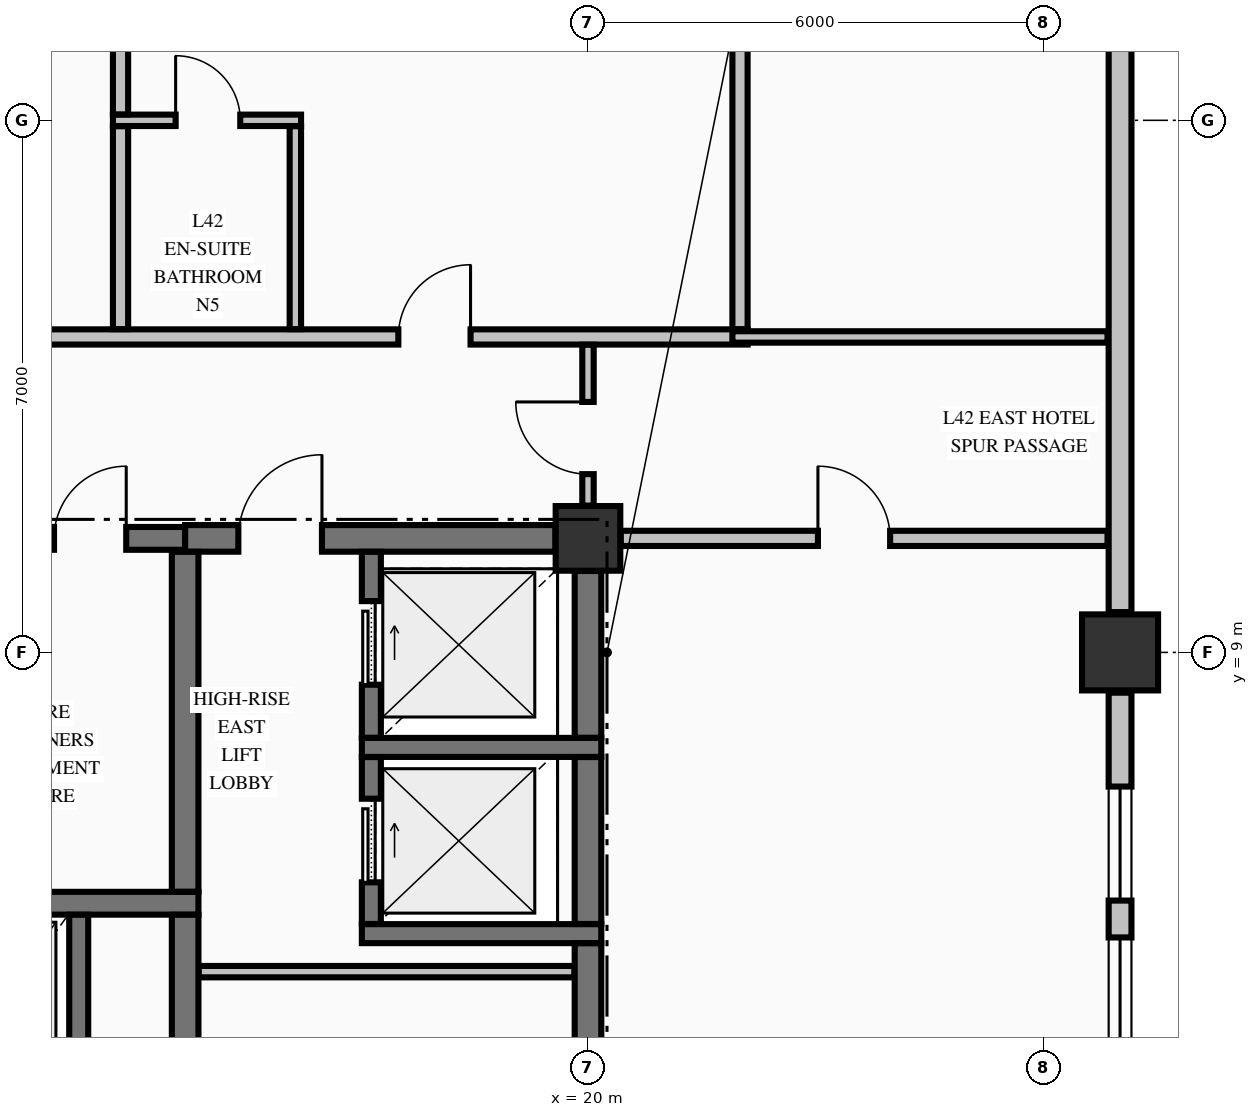
"""IFC4 building model, lengths in metres.
Left out: names, types, materials, properties, quantities, classifications, styles, units other than length and angle.
Written with IfcOpenShell. Run it as: python <this file> out.ifc"""

import sys

from ifc_helpers import new_model, si_unit, direction, frame, frame_2d, origin, origin_2d, place, context, subcontext, project, spatial, rectangle, extrude, element, fill, save


model = new_model("IFC4")
c1 = context("Model", 3, precision=1e-05, world=origin(), true_north=direction((0.0, 1.0)))
c2 = subcontext(c1, "Body", "Model", "MODEL_VIEW")
j1 = project(units=[si_unit("LENGTHUNIT", "METRE"), si_unit("PLANEANGLEUNIT", "RADIAN")], contexts=[c1])
p1 = place(None, origin())
s1 = spatial("IfcSite", under=j1, at=p1, CompositionType="ELEMENT")
p2 = place(p1, origin())
s2 = spatial("IfcBuilding", under=s1, at=p2, CompositionType="ELEMENT")
p3 = place(p2, frame((0.0, 0.0, 166.06)))
s3 = spatial("IfcBuildingStorey", under=s2, at=p3, CompositionType="ELEMENT", Elevation=166.06)
p4 = place(p3, frame((27.0, 9.0, -0.25), z_axis=(0.0, 0.0, 1.0), x_axis=(1.0, 0.0, 0.0)))
e1 = element("IfcColumn", 1, at=p4, inside=s3, PredefinedType="COLUMN", context=c2, shape_type="SweptSolid", body=[
    extrude(rectangle(XDim=1.0, YDim=1.0, at=origin_2d()), origin(), (0.0, 0.0, 1.0), 3.4),
])
p5 = place(p3, frame((20.0, 10.5, -0.25), z_axis=(0.0, 0.0, 1.0), x_axis=(1.0, 0.0, 0.0)))
e2 = element("IfcColumn", 2, at=p5, inside=s3, PredefinedType="COLUMN", context=c2, shape_type="SweptSolid", body=[
    extrude(rectangle(XDim=0.85, YDim=0.85, at=origin_2d()), origin(), (0.0, 0.0, 1.0), 3.4),
])
p6 = place(p3, frame((27.0, 0.53, 0.0), z_axis=(0.0, 0.0, 1.0), x_axis=(0.0, 1.0, 0.0)))
e3 = element("IfcWall", 3, at=p6, inside=s3, PredefinedType="STANDARD", context=c2, shape_type="SweptSolid", body=[
    extrude(rectangle(XDim=7.94, YDim=0.3, at=frame_2d((3.97, 0.0))), origin(), (0.0, 0.0, 1.0), 2.542),
])
p7 = place(p6, frame((1.235, 0.0, 0.72)))
e4 = element("IfcOpeningElement", 4, at=p7, cuts=e3, PredefinedType="OPENING", context=c2, shape_type="SweptSolid", body=[
    extrude(rectangle(XDim=1.5, YDim=1.6, at=frame_2d((0.75, 0.8))), frame((0.0, 0.16, 0.0), z_axis=(0.0, -1.0, 0.0), x_axis=(1.0, 0.0, 0.0)), (0.0, 0.0, 1.0), 0.32),
])
p8 = place(p6, frame((3.22, 0.0, 0.72)))
e5 = element("IfcOpeningElement", 5, at=p8, cuts=e3, PredefinedType="OPENING", context=c2, shape_type="SweptSolid", body=[
    extrude(rectangle(XDim=1.5, YDim=1.6, at=frame_2d((0.75, 0.8))), frame((0.0, 0.16, 0.0), z_axis=(0.0, -1.0, 0.0), x_axis=(1.0, 0.0, 0.0)), (0.0, 0.0, 1.0), 0.32),
])
p9 = place(p6, frame((5.205, 0.0, 0.72)))
e6 = element("IfcOpeningElement", 6, at=p9, cuts=e3, PredefinedType="OPENING", context=c2, shape_type="SweptSolid", body=[
    extrude(rectangle(XDim=1.5, YDim=1.6, at=frame_2d((0.75, 0.8))), frame((0.0, 0.16, 0.0), z_axis=(0.0, -1.0, 0.0), x_axis=(1.0, 0.0, 0.0)), (0.0, 0.0, 1.0), 0.32),
])
p10 = place(p3, frame((27.0, 9.53, 0.0), z_axis=(0.0, 0.0, 1.0), x_axis=(0.0, 1.0, 0.0)))
e7 = element("IfcWall", 7, at=p10, inside=s3, PredefinedType="STANDARD", context=c2, shape_type="SweptSolid", body=[
    extrude(rectangle(XDim=9.44, YDim=0.3, at=frame_2d((4.72, 0.0))), origin(), (0.0, 0.0, 1.0), 2.542),
])
p11 = place(p3, frame((17.025, 5.3, 0.0), z_axis=(0.0, 0.0, 1.0), x_axis=(1.0, 0.0, 0.0)))
e8 = element("IfcWall", 8, at=p11, inside=s3, PredefinedType="SOLIDWALL", context=c2, shape_type="SweptSolid", body=[
    extrude(rectangle(XDim=3.15, YDim=0.25, at=frame_2d((1.575, 0.0))), origin(), (0.0, 0.0, 1.0), 3.15),
])
p12 = place(p3, frame((10.85, 5.7, 0.0), z_axis=(0.0, 0.0, 1.0), x_axis=(1.0, 0.0, 0.0)))
e9 = element("IfcWall", 9, at=p12, inside=s3, PredefinedType="SHEAR", context=c2, shape_type="SweptSolid", body=[
    extrude(rectangle(XDim=4.025, YDim=0.3, at=frame_2d((2.012, 0.0))), origin(), (0.0, 0.0, 1.0), 3.15),
])
p13 = place(p3, frame((17.025, 7.75, 0.0), z_axis=(0.0, 0.0, 1.0), x_axis=(1.0, 0.0, 0.0)))
e10 = element("IfcWall", 10, at=p13, inside=s3, PredefinedType="SOLIDWALL", context=c2, shape_type="SweptSolid", body=[
    extrude(rectangle(XDim=3.15, YDim=0.25, at=frame_2d((1.575, 0.0))), origin(), (0.0, 0.0, 1.0), 3.15),
])
p14 = place(p3, frame((11.429, 10.5, 0.0), z_axis=(0.0, 0.0, 1.0), x_axis=(1.0, 0.0, 0.0)))
e11 = element("IfcWall", 11, at=p14, inside=s3, PredefinedType="SHEAR", context=c2, shape_type="SweptSolid", body=[
    extrude(rectangle(XDim=3.271, YDim=0.3, at=frame_2d((1.635, 0.0))), origin(), (0.0, 0.0, 1.0), 3.15),
])
p15 = place(p14, frame((1.546, 0.0, 0.0)))
e12 = element("IfcOpeningElement", 12, at=p15, cuts=e11, PredefinedType="OPENING", context=c2, shape_type="SweptSolid", body=[
    extrude(rectangle(XDim=0.95, YDim=2.15, at=frame_2d((0.475, 1.075))), frame((0.0, 0.16, 0.0), z_axis=(0.0, -1.0, 0.0), x_axis=(1.0, 0.0, 0.0)), (0.0, 0.0, 1.0), 0.32),
])
p16 = place(p3, frame((14.7, 10.5, 0.0), z_axis=(0.0, 0.0, 1.0), x_axis=(1.0, 0.0, 0.0)))
e13 = element("IfcWall", 13, at=p16, inside=s3, PredefinedType="SHEAR", context=c2, shape_type="SweptSolid", body=[
    extrude(rectangle(XDim=4.871, YDim=0.35, at=frame_2d((2.436, 0.0))), origin(), (0.0, 0.0, 1.0), 3.15),
])
p17 = place(p16, frame((0.7, 0.0, 0.0)))
e14 = element("IfcOpeningElement", 14, at=p17, cuts=e13, PredefinedType="OPENING", context=c2, shape_type="SweptSolid", body=[
    extrude(rectangle(XDim=1.1, YDim=2.15, at=frame_2d((0.55, 1.075))), frame((0.0, 0.185, 0.0), z_axis=(0.0, -1.0, 0.0), x_axis=(1.0, 0.0, 0.0)), (0.0, 0.0, 1.0), 0.37),
])
p18 = place(p3, frame((14.878, 4.8, 0.0), z_axis=(0.0, 0.0, 1.0), x_axis=(1.0, 0.0, 0.0)))
e15 = element("IfcWall", 15, at=p18, inside=s3, PredefinedType="PARTITIONING", context=c2, shape_type="SweptSolid", body=[
    extrude(rectangle(XDim=4.944, YDim=0.15, at=frame_2d((2.472, 0.0))), origin(), (0.0, 0.0, 1.0), 3.15),
])
p19 = place(p3, frame((20.431, 10.5, 0.0), z_axis=(0.0, 0.0, 1.0), x_axis=(1.0, 0.0, 0.0)))
e16 = element("IfcWall", 16, at=p19, inside=s3, PredefinedType="PARTITIONING", context=c2, shape_type="SweptSolid", body=[
    extrude(rectangle(XDim=6.404, YDim=0.2, at=frame_2d((3.202, 0.0))), origin(), (0.0, 0.0, 1.0), 3.15),
])
p20 = place(p19, frame((2.594, 0.0, 0.0)))
e17 = element("IfcOpeningElement", 17, at=p20, cuts=e16, PredefinedType="OPENING", context=c2, shape_type="SweptSolid", body=[
    extrude(rectangle(XDim=0.95, YDim=2.15, at=frame_2d((0.475, 1.075))), frame((0.0, 0.11, 0.0), z_axis=(0.0, -1.0, 0.0), x_axis=(1.0, 0.0, 0.0)), (0.0, 0.0, 1.0), 0.22),
])
p21 = place(p3, frame((-17.1, 13.15, 0.0), z_axis=(0.0, 0.0, 1.0), x_axis=(1.0, 0.0, 0.0)))
e18 = element("IfcWall", 18, at=p21, inside=s3, PredefinedType="PARTITIONING", context=c2, shape_type="SweptSolid", body=[
    extrude(rectangle(XDim=39.2, YDim=0.2, at=frame_2d((19.6, 0.0))), origin(), (0.0, 0.0, 1.0), 3.15),
])
p22 = place(p21, frame((3.575, 0.0, 0.0)))
e19 = element("IfcOpeningElement", 19, at=p22, cuts=e18, PredefinedType="OPENING", context=c2, shape_type="SweptSolid", body=[
    extrude(rectangle(XDim=0.95, YDim=2.15, at=frame_2d((0.475, 1.075))), frame((0.0, 0.11, 0.0), z_axis=(0.0, -1.0, 0.0), x_axis=(1.0, 0.0, 0.0)), (0.0, 0.0, 1.0), 0.22),
])
p23 = place(p21, frame((14.625, 0.0, 0.0)))
e20 = element("IfcOpeningElement", 20, at=p23, cuts=e18, PredefinedType="OPENING", context=c2, shape_type="SweptSolid", body=[
    extrude(rectangle(XDim=0.95, YDim=2.15, at=frame_2d((0.475, 1.075))), frame((0.0, 0.11, 0.0), z_axis=(0.0, -1.0, 0.0), x_axis=(1.0, 0.0, 0.0)), (0.0, 0.0, 1.0), 0.22),
])
p24 = place(p21, frame((21.125, 0.0, 0.0)))
e21 = element("IfcOpeningElement", 21, at=p24, cuts=e18, PredefinedType="OPENING", context=c2, shape_type="SweptSolid", body=[
    extrude(rectangle(XDim=0.95, YDim=2.15, at=frame_2d((0.475, 1.075))), frame((0.0, 0.11, 0.0), z_axis=(0.0, -1.0, 0.0), x_axis=(1.0, 0.0, 0.0)), (0.0, 0.0, 1.0), 0.22),
])
p25 = place(p21, frame((27.425, 0.0, 0.0)))
e22 = element("IfcOpeningElement", 22, at=p25, cuts=e18, PredefinedType="OPENING", context=c2, shape_type="SweptSolid", body=[
    extrude(rectangle(XDim=0.95, YDim=2.15, at=frame_2d((0.475, 1.075))), frame((0.0, 0.11, 0.0), z_axis=(0.0, -1.0, 0.0), x_axis=(1.0, 0.0, 0.0)), (0.0, 0.0, 1.0), 0.22),
])
p26 = place(p21, frame((34.605, 0.0, 0.0)))
e23 = element("IfcOpeningElement", 23, at=p26, cuts=e18, PredefinedType="OPENING", context=c2, shape_type="SweptSolid", body=[
    extrude(rectangle(XDim=0.95, YDim=2.15, at=frame_2d((0.475, 1.075))), frame((0.0, 0.11, 0.0), z_axis=(0.0, -1.0, 0.0), x_axis=(1.0, 0.0, 0.0)), (0.0, 0.0, 1.0), 0.22),
])
p27 = place(p3, frame((21.9, 13.15, 0.0), z_axis=(0.0, 0.0, 1.0), x_axis=(1.0, 0.0, 0.0)))
e24 = element("IfcWall", 24, at=p27, inside=s3, PredefinedType="PARTITIONING", context=c2, shape_type="SweptSolid", body=[
    extrude(rectangle(XDim=4.935, YDim=0.15, at=frame_2d((2.468, 0.0))), origin(), (0.0, 0.0, 1.0), 3.15),
])
p28 = place(p3, frame((13.75, 16.0, 0.0), z_axis=(0.0, 0.0, 1.0), x_axis=(1.0, 0.0, 0.0)))
e25 = element("IfcWall", 25, at=p28, inside=s3, PredefinedType="PARTITIONING", context=c2, shape_type="SweptSolid", body=[
    extrude(rectangle(XDim=2.475, YDim=0.15, at=frame_2d((1.238, 0.0))), origin(), (0.0, 0.0, 1.0), 3.15),
])
p29 = place(p28, frame((0.825, 0.0, 0.0)))
e26 = element("IfcOpeningElement", 26, at=p29, cuts=e25, PredefinedType="OPENING", context=c2, shape_type="SweptSolid", body=[
    extrude(rectangle(XDim=0.85, YDim=2.1, at=frame_2d((0.425, 1.05))), frame((0.0, 0.085, 0.0), z_axis=(0.0, -1.0, 0.0), x_axis=(1.0, 0.0, 0.0)), (0.0, 0.0, 1.0), 0.17),
])
p30 = place(p3, frame((13.3, 3.052, 0.0), z_axis=(0.0, 0.0, 1.0), x_axis=(0.0, 1.0, 0.0)))
e27 = element("IfcWall", 27, at=p30, inside=s3, PredefinedType="SOLIDWALL", context=c2, shape_type="SweptSolid", body=[
    extrude(rectangle(XDim=2.496, YDim=0.25, at=frame_2d((1.248, 0.0))), origin(), (0.0, 0.0, 1.0), 3.15),
])
p31 = place(p3, frame((14.7, 3.052, 0.0), z_axis=(0.0, 0.0, 1.0), x_axis=(0.0, 1.0, 0.0)))
e28 = element("IfcWall", 28, at=p31, inside=s3, PredefinedType="SHEAR", context=c2, shape_type="SweptSolid", body=[
    extrude(rectangle(XDim=2.496, YDim=0.35, at=frame_2d((1.248, 0.0))), origin(), (0.0, 0.0, 1.0), 3.15),
])
p32 = place(p3, frame((14.7, 5.852, 0.0), z_axis=(0.0, 0.0, 1.0), x_axis=(0.0, 1.0, 0.0)))
e29 = element("IfcWall", 29, at=p32, inside=s3, PredefinedType="SHEAR", context=c2, shape_type="SweptSolid", body=[
    extrude(rectangle(XDim=4.471, YDim=0.35, at=frame_2d((2.235, 0.0))), origin(), (0.0, 0.0, 1.0), 3.15),
])
p33 = place(p3, frame((17.15, 5.427, 0.0), z_axis=(0.0, 0.0, 1.0), x_axis=(0.0, 1.0, 0.0)))
e30 = element("IfcWall", 30, at=p33, inside=s3, PredefinedType="SOLIDWALL", context=c2, shape_type="SweptSolid", body=[
    extrude(rectangle(XDim=2.196, YDim=0.25, at=frame_2d((1.098, 0.0))), origin(), (0.0, 0.0, 1.0), 3.15),
])
p34 = place(p33, frame((0.548, 0.0, 0.0)))
e31 = element("IfcOpeningElement", 31, at=p34, cuts=e30, PredefinedType="OPENING", context=c2, shape_type="SweptSolid", body=[
    extrude(rectangle(XDim=1.1, YDim=2.2, at=frame_2d((0.55, 1.1))), frame((0.0, 0.135, 0.0), z_axis=(0.0, -1.0, 0.0), x_axis=(1.0, 0.0, 0.0)), (0.0, 0.0, 1.0), 0.27),
])
p35 = place(p3, frame((17.15, 7.877, 0.0), z_axis=(0.0, 0.0, 1.0), x_axis=(0.0, 1.0, 0.0)))
e32 = element("IfcWall", 32, at=p35, inside=s3, PredefinedType="SOLIDWALL", context=c2, shape_type="SweptSolid", body=[
    extrude(rectangle(XDim=2.446, YDim=0.25, at=frame_2d((1.223, 0.0))), origin(), (0.0, 0.0, 1.0), 3.15),
])
p36 = place(p35, frame((0.698, 0.0, 0.0)))
e33 = element("IfcOpeningElement", 33, at=p36, cuts=e32, PredefinedType="OPENING", context=c2, shape_type="SweptSolid", body=[
    extrude(rectangle(XDim=1.1, YDim=2.2, at=frame_2d((0.55, 1.1))), frame((0.0, 0.135, 0.0), z_axis=(0.0, -1.0, 0.0), x_axis=(1.0, 0.0, 0.0)), (0.0, 0.0, 1.0), 0.27),
])
p37 = place(p3, frame((20.0, 0.429, 0.0), z_axis=(0.0, 0.0, 1.0), x_axis=(0.0, 1.0, 0.0)))
e34 = element("IfcWall", 34, at=p37, inside=s3, PredefinedType="SHEAR", context=c2, shape_type="SweptSolid", body=[
    extrude(rectangle(XDim=4.744, YDim=0.35, at=frame_2d((2.372, 0.0))), origin(), (0.0, 0.0, 1.0), 3.15),
])
p38 = place(p3, frame((20.0, 5.427, 0.0), z_axis=(0.0, 0.0, 1.0), x_axis=(0.0, 1.0, 0.0)))
e35 = element("IfcWall", 35, at=p38, inside=s3, PredefinedType="SHEAR", context=c2, shape_type="SweptSolid", body=[
    extrude(rectangle(XDim=2.196, YDim=0.35, at=frame_2d((1.098, 0.0))), origin(), (0.0, 0.0, 1.0), 3.15),
])
p39 = place(p3, frame((20.0, 7.877, 0.0), z_axis=(0.0, 0.0, 1.0), x_axis=(0.0, 1.0, 0.0)))
e36 = element("IfcWall", 36, at=p39, inside=s3, PredefinedType="SHEAR", context=c2, shape_type="SweptSolid", body=[
    extrude(rectangle(XDim=2.194, YDim=0.35, at=frame_2d((1.097, 0.0))), origin(), (0.0, 0.0, 1.0), 3.15),
])
p40 = place(p3, frame((13.85, 13.253, 0.0), z_axis=(0.0, 0.0, 1.0), x_axis=(0.0, 1.0, 0.0)))
e37 = element("IfcWall", 37, at=p40, inside=s3, PredefinedType="PARTITIONING", context=c2, shape_type="SweptSolid", body=[
    extrude(rectangle(XDim=2.669, YDim=0.2, at=frame_2d((1.334, 0.0))), origin(), (0.0, 0.0, 1.0), 3.15),
])
p41 = place(p3, frame((13.85, 16.078, 0.0), z_axis=(0.0, 0.0, 1.0), x_axis=(0.0, 1.0, 0.0)))
e38 = element("IfcWall", 38, at=p41, inside=s3, PredefinedType="PARTITIONING", context=c2, shape_type="SweptSolid", body=[
    extrude(rectangle(XDim=8.257, YDim=0.2, at=frame_2d((4.128, 0.0))), origin(), (0.0, 0.0, 1.0), 3.15),
])
p42 = place(p3, frame((16.15, 13.253, 0.0), z_axis=(0.0, 0.0, 1.0), x_axis=(0.0, 1.0, 0.0)))
e39 = element("IfcWall", 39, at=p42, inside=s3, PredefinedType="PARTITIONING", context=c2, shape_type="SweptSolid", body=[
    extrude(rectangle(XDim=2.669, YDim=0.15, at=frame_2d((1.334, 0.0))), origin(), (0.0, 0.0, 1.0), 3.15),
])
p43 = place(p3, frame((20.0, 10.931, 0.0), z_axis=(0.0, 0.0, 1.0), x_axis=(0.0, 1.0, 0.0)))
e40 = element("IfcWall", 40, at=p43, inside=s3, PredefinedType="PARTITIONING", context=c2, shape_type="SweptSolid", body=[
    extrude(rectangle(XDim=2.116, YDim=0.15, at=frame_2d((1.058, 0.0))), origin(), (0.0, 0.0, 1.0), 2.342),
])
p44 = place(p43, frame((0.414, 0.0, 0.0)))
e41 = element("IfcOpeningElement", 41, at=p44, cuts=e40, PredefinedType="OPENING", context=c2, shape_type="SweptSolid", body=[
    extrude(rectangle(XDim=0.95, YDim=2.15, at=frame_2d((0.475, 1.075))), frame((0.0, 0.085, 0.0), z_axis=(0.0, -1.0, 0.0), x_axis=(1.0, 0.0, 0.0)), (0.0, 0.0, 1.0), 0.17),
])
p45 = place(p3, frame((22.0, 13.253, 0.0), z_axis=(0.0, 0.0, 1.0), x_axis=(0.0, 1.0, 0.0)))
e42 = element("IfcWall", 42, at=p45, inside=s3, PredefinedType="PARTITIONING", context=c2, shape_type="SweptSolid", body=[
    extrude(rectangle(XDim=5.741, YDim=0.2, at=frame_2d((2.871, 0.0))), origin(), (0.0, 0.0, 1.0), 3.15),
])
p46 = place(p8, origin())
e43 = element("IfcWindow", 43, at=p46, inside=s3, PartitioningType="SINGLE_PANEL", PredefinedType="WINDOW", context=c2, shape_type="SweptSolid", body=[
    extrude(rectangle(XDim=1.5, YDim=1.6, at=frame_2d((0.75, 0.8))), frame((0.0, 0.03, 0.0), z_axis=(0.0, -1.0, 0.0), x_axis=(1.0, 0.0, 0.0)), (0.0, 0.0, 1.0), 0.06),
])
fill(e5, e43)
p47 = place(p9, origin())
e44 = element("IfcWindow", 44, at=p47, inside=s3, PartitioningType="SINGLE_PANEL", PredefinedType="WINDOW", context=c2, shape_type="SweptSolid", body=[
    extrude(rectangle(XDim=1.5, YDim=1.6, at=frame_2d((0.75, 0.8))), frame((0.0, 0.03, 0.0), z_axis=(0.0, -1.0, 0.0), x_axis=(1.0, 0.0, 0.0)), (0.0, 0.0, 1.0), 0.06),
])
fill(e6, e44)
p48 = place(p15, origin())
e45 = element("IfcDoor", 45, at=p48, inside=s3, OperationType="SINGLE_SWING_RIGHT", PredefinedType="DOOR", context=c2, shape_type="SweptSolid", body=[
    extrude(rectangle(XDim=0.95, YDim=2.15, at=frame_2d((0.475, 1.075))), frame((0.0, 0.025, 0.0), z_axis=(0.0, -1.0, 0.0), x_axis=(1.0, 0.0, 0.0)), (0.0, 0.0, 1.0), 0.05),
])
fill(e12, e45)
p49 = place(p34, origin())
e46 = element("IfcDoor", 46, at=p49, inside=s3, OperationType="SLIDING_TO_RIGHT", PredefinedType="DOOR", context=c2, shape_type="SweptSolid", body=[
    extrude(rectangle(XDim=1.1, YDim=2.2, at=frame_2d((0.55, 1.1))), frame((0.0, 0.025, 0.0), z_axis=(0.0, -1.0, 0.0), x_axis=(1.0, 0.0, 0.0)), (0.0, 0.0, 1.0), 0.05),
])
fill(e31, e46)
p50 = place(p36, origin())
e47 = element("IfcDoor", 47, at=p50, inside=s3, OperationType="SLIDING_TO_RIGHT", PredefinedType="DOOR", context=c2, shape_type="SweptSolid", body=[
    extrude(rectangle(XDim=1.1, YDim=2.2, at=frame_2d((0.55, 1.1))), frame((0.0, 0.025, 0.0), z_axis=(0.0, -1.0, 0.0), x_axis=(1.0, 0.0, 0.0)), (0.0, 0.0, 1.0), 0.05),
])
fill(e33, e47)
p51 = place(p17, origin())
e48 = element("IfcDoor", 48, at=p51, inside=s3, OperationType="SINGLE_SWING_RIGHT", PredefinedType="DOOR", context=c2, shape_type="SweptSolid", body=[
    extrude(rectangle(XDim=1.1, YDim=2.15, at=frame_2d((0.55, 1.075))), frame((0.0, 0.025, 0.0), z_axis=(0.0, -1.0, 0.0), x_axis=(1.0, 0.0, 0.0)), (0.0, 0.0, 1.0), 0.05),
])
fill(e14, e48)
p52 = place(p26, origin())
e49 = element("IfcDoor", 49, at=p52, inside=s3, OperationType="SINGLE_SWING_RIGHT", PredefinedType="DOOR", context=c2, shape_type="SweptSolid", body=[
    extrude(rectangle(XDim=0.95, YDim=2.15, at=frame_2d((0.475, 1.075))), frame((0.0, 0.025, 0.0), z_axis=(0.0, -1.0, 0.0), x_axis=(1.0, 0.0, 0.0)), (0.0, 0.0, 1.0), 0.05),
])
fill(e23, e49)
p53 = place(p29, origin())
e50 = element("IfcDoor", 50, at=p53, inside=s3, OperationType="SINGLE_SWING_LEFT", PredefinedType="DOOR", context=c2, shape_type="SweptSolid", body=[
    extrude(rectangle(XDim=0.85, YDim=2.1, at=frame_2d((0.425, 1.05))), frame((0.0, 0.025, 0.0), z_axis=(0.0, -1.0, 0.0), x_axis=(1.0, 0.0, 0.0)), (0.0, 0.0, 1.0), 0.05),
])
fill(e26, e50)
p54 = place(p44, origin())
e51 = element("IfcDoor", 51, at=p54, inside=s3, OperationType="SINGLE_SWING_RIGHT", PredefinedType="DOOR", context=c2, shape_type="SweptSolid", body=[
    extrude(rectangle(XDim=0.95, YDim=2.15, at=frame_2d((0.475, 1.075))), frame((0.0, 0.025, 0.0), z_axis=(0.0, -1.0, 0.0), x_axis=(1.0, 0.0, 0.0)), (0.0, 0.0, 1.0), 0.05),
])
fill(e41, e51)
p55 = place(p20, origin())
e52 = element("IfcDoor", 52, at=p55, inside=s3, OperationType="SINGLE_SWING_LEFT", PredefinedType="DOOR", context=c2, shape_type="SweptSolid", body=[
    extrude(rectangle(XDim=0.95, YDim=2.15, at=frame_2d((0.475, 1.075))), frame((0.0, 0.025, 0.0), z_axis=(0.0, -1.0, 0.0), x_axis=(1.0, 0.0, 0.0)), (0.0, 0.0, 1.0), 0.05),
])
fill(e17, e52)
save(model, sys.argv[1])
